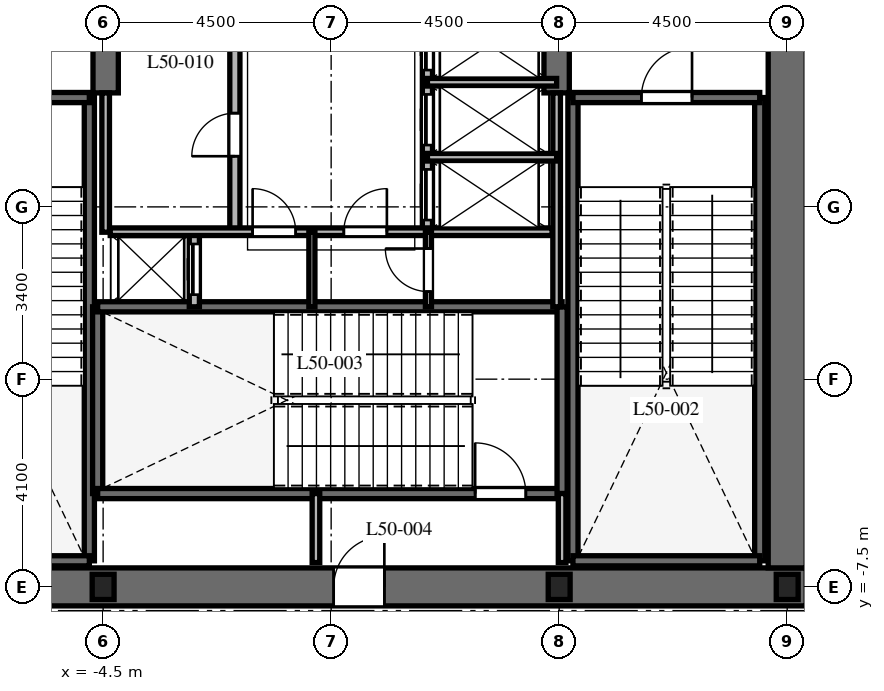
"""IFC4 building model, lengths in metres.
Left out: names, types, materials, properties, quantities, classifications, styles, units other than length and angle.
Written with IfcOpenShell. Run it as: python <this file> out.ifc"""

import sys

from ifc_helpers import new_model, si_unit, direction, frame, frame_2d, origin, origin_2d, place, context, subcontext, project, spatial, rectangle, i_section, extrude, element, fill, save


model = new_model("IFC4")
c1 = context("Model", 3, precision=1e-05, world=origin(), true_north=direction((0.0, 1.0)))
c2 = subcontext(c1, "Body", "Model", "MODEL_VIEW")
j1 = project(units=[si_unit("LENGTHUNIT", "METRE"), si_unit("PLANEANGLEUNIT", "RADIAN")], contexts=[c1])
p1 = place(None, origin())
s1 = spatial("IfcSite", under=j1, at=p1, CompositionType="ELEMENT")
p2 = place(p1, origin())
s2 = spatial("IfcBuilding", under=s1, at=p2, CompositionType="ELEMENT")
p3 = place(p2, frame((0.0, 0.0, 201.5)))
s3 = spatial("IfcBuildingStorey", under=s2, at=p3, CompositionType="ELEMENT", Elevation=201.5)
p4 = place(p3, frame((-9.375, -7.5, 0.0), z_axis=(0.0, 0.0, 1.0), x_axis=(1.0, 0.0, 0.0)))
e1 = element("IfcWall", 1, at=p4, inside=s3, PredefinedType="SHEAR", context=c2, shape_type="SweptSolid", body=[
    extrude(rectangle(XDim=18.75, YDim=0.75, at=frame_2d((9.375, 0.0))), origin(), (0.0, 0.0, 1.0), 5.0),
])
p5 = place(p4, frame((9.425, 0.0, 0.0)))
e2 = element("IfcOpeningElement", 2, at=p5, cuts=e1, PredefinedType="OPENING", context=c2, shape_type="SweptSolid", body=[
    extrude(rectangle(XDim=1.0, YDim=2.15, at=frame_2d((0.5, 1.075))), frame((0.0, 0.385, 0.0), z_axis=(0.0, -1.0, 0.0), x_axis=(1.0, 0.0, 0.0)), (0.0, 0.0, 1.0), 0.77),
])
p6 = place(p3, frame((9.0, -7.125, 0.0), z_axis=(0.0, 0.0, 1.0), x_axis=(0.0, 1.0, 0.0)))
e3 = element("IfcWall", 3, at=p6, inside=s3, PredefinedType="SHEAR", context=c2, shape_type="SweptSolid", body=[
    extrude(rectangle(XDim=14.25, YDim=0.75, at=frame_2d((7.125, 0.0))), origin(), (0.0, 0.0, 1.0), 5.0),
])
p7 = place(p6, frame((10.25, 0.0, 0.0)))
e4 = element("IfcOpeningElement", 4, at=p7, cuts=e3, PredefinedType="OPENING", context=c2, shape_type="SweptSolid", body=[
    extrude(rectangle(XDim=1.05, YDim=2.15, at=frame_2d((0.525, 1.075))), frame((0.0, 0.385, 0.0), z_axis=(0.0, -1.0, 0.0), x_axis=(1.0, 0.0, 0.0)), (0.0, 0.0, 1.0), 0.77),
])
for number, where, z_axis, x_axis in (
    (5, (-4.45, 2.25, 0.0), (0.0, 0.0, 1.0), (0.0, 1.0, 0.0)),
    (6, (4.45, 2.25, 0.0), (0.0, 0.0, 1.0), (0.0, 1.0, 0.0)),
):
    element("IfcWall", number, at=place(p3, frame(where, z_axis=z_axis, x_axis=x_axis)), inside=s3, PredefinedType="SHEAR", context=c2, shape_type="SweptSolid", body=[
        extrude(rectangle(XDim=4.875, YDim=0.5, at=frame_2d((2.438, 0.0))), origin(), (0.0, 0.0, 1.0), 5.0),
    ])
p8 = place(p3, frame((-4.772, -6.985, 0.0), z_axis=(0.0, 0.0, 1.0), x_axis=(0.0, 1.0, 0.0)))
e7 = element("IfcWall", 7, at=p8, inside=s3, PredefinedType="SHEAR", context=c2, shape_type="SweptSolid", body=[
    extrude(rectangle(XDim=9.143, YDim=0.2, at=frame_2d((4.572, 0.0))), origin(), (0.0, 0.0, 1.0), 5.0),
])
p9 = place(p3, frame((-8.458, -6.985, 0.0), z_axis=(0.0, 0.0, 1.0), x_axis=(1.0, 0.0, 0.0)))
e8 = element("IfcWall", 8, at=p9, inside=s3, PredefinedType="SHEAR", context=c2, shape_type="SweptSolid", body=[
    extrude(rectangle(XDim=3.686, YDim=0.2, at=frame_2d((1.843, 0.0))), origin(), (0.0, 0.0, 1.0), 5.0),
])
p10 = place(p3, frame((-8.458, 2.158, 0.0), z_axis=(0.0, 0.0, 1.0), x_axis=(1.0, 0.0, 0.0)))
e9 = element("IfcWall", 9, at=p10, inside=s3, PredefinedType="SHEAR", context=c2, shape_type="SweptSolid", body=[
    extrude(rectangle(XDim=3.686, YDim=0.2, at=frame_2d((1.843, 0.0))), origin(), (0.0, 0.0, 1.0), 5.0),
])
p11 = place(p10, frame((1.3, 0.0, 0.0)))
e10 = element("IfcOpeningElement", 10, at=p11, cuts=e9, PredefinedType="OPENING", context=c2, shape_type="SweptSolid", body=[
    extrude(rectangle(XDim=1.0, YDim=2.15, at=frame_2d((0.5, 1.075))), frame((0.0, 0.11, 0.0), z_axis=(0.0, -1.0, 0.0), x_axis=(1.0, 0.0, 0.0)), (0.0, 0.0, 1.0), 0.22),
])
for number, where, z_axis, x_axis in (
    (11, (4.772, -6.985, 0.0), (0.0, 0.0, 1.0), (0.0, 1.0, 0.0)),
    (12, (8.458, -6.985, 0.0), (0.0, 0.0, 1.0), (0.0, 1.0, 0.0)),
):
    element("IfcWall", number, at=place(p3, frame(where, z_axis=z_axis, x_axis=x_axis)), inside=s3, PredefinedType="SHEAR", context=c2, shape_type="SweptSolid", body=[
        extrude(rectangle(XDim=9.143, YDim=0.2, at=frame_2d((4.572, 0.0))), origin(), (0.0, 0.0, 1.0), 5.0),
    ])
p12 = place(p3, frame((4.772, -6.985, 0.0), z_axis=(0.0, 0.0, 1.0), x_axis=(1.0, 0.0, 0.0)))
e13 = element("IfcWall", 13, at=p12, inside=s3, PredefinedType="SHEAR", context=c2, shape_type="SweptSolid", body=[
    extrude(rectangle(XDim=3.686, YDim=0.2, at=frame_2d((1.843, 0.0))), origin(), (0.0, 0.0, 1.0), 5.0),
])
p13 = place(p3, frame((4.772, 2.158, 0.0), z_axis=(0.0, 0.0, 1.0), x_axis=(1.0, 0.0, 0.0)))
e14 = element("IfcWall", 14, at=p13, inside=s3, PredefinedType="SHEAR", context=c2, shape_type="SweptSolid", body=[
    extrude(rectangle(XDim=3.686, YDim=0.2, at=frame_2d((1.843, 0.0))), origin(), (0.0, 0.0, 1.0), 5.0),
])
p14 = place(p13, frame((1.35, 0.0, 0.0)))
e15 = element("IfcOpeningElement", 15, at=p14, cuts=e14, PredefinedType="OPENING", context=c2, shape_type="SweptSolid", body=[
    extrude(rectangle(XDim=1.0, YDim=2.15, at=frame_2d((0.5, 1.075))), frame((0.0, 0.11, 0.0), z_axis=(0.0, -1.0, 0.0), x_axis=(1.0, 0.0, 0.0)), (0.0, 0.0, 1.0), 0.22),
])
p15 = place(p3, frame((-4.608, -5.658, 0.0), z_axis=(0.0, 0.0, 1.0), x_axis=(0.0, 1.0, 0.0)))
e16 = element("IfcWall", 16, at=p15, inside=s3, PredefinedType="SHEAR", context=c2, shape_type="SweptSolid", body=[
    extrude(rectangle(XDim=3.686, YDim=0.2, at=frame_2d((1.843, 0.0))), origin(), (0.0, 0.0, 1.0), 5.0),
])
p16 = place(p3, frame((-4.608, -5.658, 0.0), z_axis=(0.0, 0.0, 1.0), x_axis=(1.0, 0.0, 0.0)))
e17 = element("IfcWall", 17, at=p16, inside=s3, PredefinedType="SHEAR", context=c2, shape_type="SweptSolid", body=[
    extrude(rectangle(XDim=9.166, YDim=0.2, at=frame_2d((4.583, 0.0))), origin(), (0.0, 0.0, 1.0), 5.0),
])
p17 = place(p16, frame((7.45, 0.0, 0.0)))
e18 = element("IfcOpeningElement", 18, at=p17, cuts=e17, PredefinedType="OPENING", context=c2, shape_type="SweptSolid", body=[
    extrude(rectangle(XDim=1.0, YDim=2.15, at=frame_2d((0.5, 1.075))), frame((0.0, 0.11, 0.0), z_axis=(0.0, -1.0, 0.0), x_axis=(1.0, 0.0, 0.0)), (0.0, 0.0, 1.0), 0.22),
])
p18 = place(p3, frame((-4.608, -1.972, 0.0), z_axis=(0.0, 0.0, 1.0), x_axis=(1.0, 0.0, 0.0)))
e19 = element("IfcWall", 19, at=p18, inside=s3, PredefinedType="SHEAR", context=c2, shape_type="SweptSolid", body=[
    extrude(rectangle(XDim=9.166, YDim=0.2, at=frame_2d((4.583, 0.0))), origin(), (0.0, 0.0, 1.0), 5.0),
])
p19 = place(p3, frame((4.558, -5.658, 0.0), z_axis=(0.0, 0.0, 1.0), x_axis=(0.0, 1.0, 0.0)))
e20 = element("IfcWall", 20, at=p19, inside=s3, PredefinedType="SHEAR", context=c2, shape_type="SweptSolid", body=[
    extrude(rectangle(XDim=3.686, YDim=0.2, at=frame_2d((1.843, 0.0))), origin(), (0.0, 0.0, 1.0), 5.0),
])
for number, where, z_axis, x_axis in (
    (21, (-4.5, -7.5, 0.0), (0.0, 0.0, 1.0), (1.0, 0.0, 0.0)),
    (22, (4.5, -7.5, 0.0), (0.0, 0.0, 1.0), (1.0, 0.0, 0.0)),
    (23, (9.0, -7.5, 0.0), (0.0, 0.0, 1.0), (1.0, 0.0, 0.0)),
):
    element("IfcColumn", number, at=place(p3, frame(where, z_axis=z_axis, x_axis=x_axis)), inside=s3, PredefinedType="COLUMN", context=c2, shape_type="SweptSolid", body=[
        extrude(i_section(OverallWidth=0.432, OverallDepth=0.498, WebThickness=0.056, FlangeThickness=0.089, at=origin_2d()), origin(), (0.0, 0.0, 1.0), 5.0),
    ])
for number, where, z_axis, x_axis in (
    (24, (-0.3, -7.02, 0.0), (0.0, 0.0, 1.0), (0.0, 1.0, 0.0)),
    (25, (4.558, -7.02, 0.0), (0.0, 0.0, 1.0), (0.0, 1.0, 0.0)),
):
    element("IfcWall", number, at=place(p3, frame(where, z_axis=z_axis, x_axis=x_axis)), inside=s3, PredefinedType="PARTITIONING", context=c2, shape_type="SweptSolid", body=[
        extrude(rectangle(XDim=1.362, YDim=0.15, at=frame_2d((0.681, 0.0))), origin(), (0.0, 0.0, 1.0), 4.7),
    ])
p20 = place(p3, frame((-2.7, -1.972, 0.0), z_axis=(0.0, 0.0, 1.0), x_axis=(0.0, 1.0, 0.0)))
e26 = element("IfcWall", 26, at=p20, inside=s3, PredefinedType="PARTITIONING", context=c2, shape_type="SweptSolid", body=[
    extrude(rectangle(XDim=1.472, YDim=0.2, at=frame_2d((0.736, 0.0))), origin(), (0.0, 0.0, 1.0), 4.7),
])
p21 = place(p20, frame((0.24, 0.0, 0.0)))
e27 = element("IfcOpeningElement", 27, at=p21, cuts=e26, PredefinedType="OPENING", context=c2, shape_type="SweptSolid", body=[
    extrude(rectangle(XDim=1.0, YDim=2.2, at=frame_2d((0.5, 1.1))), frame((0.0, 0.11, 0.0), z_axis=(0.0, -1.0, 0.0), x_axis=(1.0, 0.0, 0.0)), (0.0, 0.0, 1.0), 0.22),
])
p22 = place(p3, frame((-4.45, -0.5, 0.0), z_axis=(0.0, 0.0, 1.0), x_axis=(0.0, 1.0, 0.0)))
e28 = element("IfcWall", 28, at=p22, inside=s3, PredefinedType="PARTITIONING", context=c2, shape_type="SweptSolid", body=[
    extrude(rectangle(XDim=2.75, YDim=0.15, at=frame_2d((1.375, 0.0))), origin(), (0.0, 0.0, 1.0), 4.7),
])
p23 = place(p3, frame((4.45, -1.972, 0.0), z_axis=(0.0, 0.0, 1.0), x_axis=(0.0, 1.0, 0.0)))
e29 = element("IfcWall", 29, at=p23, inside=s3, PredefinedType="PARTITIONING", context=c2, shape_type="SweptSolid", body=[
    extrude(rectangle(XDim=4.222, YDim=0.15, at=frame_2d((2.111, 0.0))), origin(), (0.0, 0.0, 1.0), 4.7),
])
p24 = place(p3, frame((-1.9, -0.5, 0.0), z_axis=(0.0, 0.0, 1.0), x_axis=(0.0, 1.0, 0.0)))
e30 = element("IfcWall", 30, at=p24, inside=s3, PredefinedType="PARTITIONING", context=c2, shape_type="SweptSolid", body=[
    extrude(rectangle(XDim=4.44, YDim=0.2, at=frame_2d((2.22, 0.0))), origin(), (0.0, 0.0, 1.0), 4.7),
])
p25 = place(p24, frame((1.5, 0.0, 0.0)))
e31 = element("IfcOpeningElement", 31, at=p25, cuts=e30, PredefinedType="OPENING", context=c2, shape_type="SweptSolid", body=[
    extrude(rectangle(XDim=0.85, YDim=2.03, at=frame_2d((0.425, 1.015))), frame((0.0, 0.11, 0.0), z_axis=(0.0, -1.0, 0.0), x_axis=(1.0, 0.0, 0.0)), (0.0, 0.0, 1.0), 0.22),
])
p26 = place(p3, frame((1.9, -0.5, 0.0), z_axis=(0.0, 0.0, 1.0), x_axis=(0.0, 1.0, 0.0)))
e32 = element("IfcWall", 32, at=p26, inside=s3, PredefinedType="PARTITIONING", context=c2, shape_type="SweptSolid", body=[
    extrude(rectangle(XDim=4.44, YDim=0.2, at=frame_2d((2.22, 0.0))), origin(), (0.0, 0.0, 1.0), 4.7),
])
p27 = place(p26, frame((0.24, 0.0, 0.0)))
e33 = element("IfcOpeningElement", 33, at=p27, cuts=e32, PredefinedType="OPENING", context=c2, shape_type="SweptSolid", body=[
    extrude(rectangle(XDim=1.0, YDim=2.2, at=frame_2d((0.5, 1.1))), frame((0.0, 0.11, 0.0), z_axis=(0.0, -1.0, 0.0), x_axis=(1.0, 0.0, 0.0)), (0.0, 0.0, 1.0), 0.22),
])
p28 = place(p26, frame((1.72, 0.0, 0.0)))
e34 = element("IfcOpeningElement", 34, at=p28, cuts=e32, PredefinedType="OPENING", context=c2, shape_type="SweptSolid", body=[
    extrude(rectangle(XDim=1.0, YDim=2.2, at=frame_2d((0.5, 1.1))), frame((0.0, 0.11, 0.0), z_axis=(0.0, -1.0, 0.0), x_axis=(1.0, 0.0, 0.0)), (0.0, 0.0, 1.0), 0.22),
])
p29 = place(p26, frame((3.2, 0.0, 0.0)))
e35 = element("IfcOpeningElement", 35, at=p29, cuts=e32, PredefinedType="OPENING", context=c2, shape_type="SweptSolid", body=[
    extrude(rectangle(XDim=1.0, YDim=2.2, at=frame_2d((0.5, 1.1))), frame((0.0, 0.11, 0.0), z_axis=(0.0, -1.0, 0.0), x_axis=(1.0, 0.0, 0.0)), (0.0, 0.0, 1.0), 0.22),
])
for number, where, z_axis, x_axis in (
    (36, (1.9, 0.98, 0.0), (0.0, 0.0, 1.0), (1.0, 0.0, 0.0)),
    (37, (1.9, 2.46, 0.0), (0.0, 0.0, 1.0), (1.0, 0.0, 0.0)),
):
    element("IfcWall", number, at=place(p3, frame(where, z_axis=z_axis, x_axis=x_axis)), inside=s3, PredefinedType="PARTITIONING", context=c2, shape_type="SweptSolid", body=[
        extrude(rectangle(XDim=2.55, YDim=0.15, at=frame_2d((1.275, 0.0))), origin(), (0.0, 0.0, 1.0), 4.7),
    ])
p30 = place(p3, frame((-4.36, -0.49, 0.0), z_axis=(0.0, 0.0, 1.0), x_axis=(1.0, 0.0, 0.0)))
e38 = element("IfcWall", 38, at=p30, inside=s3, PredefinedType="PARTITIONING", context=c2, shape_type="SweptSolid", body=[
    extrude(rectangle(XDim=8.72, YDim=0.15, at=frame_2d((4.36, 0.0))), origin(), (0.0, 0.0, 1.0), 4.7),
])
p31 = place(p30, frame((2.81, 0.0, 0.0)))
e39 = element("IfcOpeningElement", 39, at=p31, cuts=e38, PredefinedType="OPENING", context=c2, shape_type="SweptSolid", body=[
    extrude(rectangle(XDim=0.85, YDim=2.03, at=frame_2d((0.425, 1.015))), frame((0.0, 0.085, 0.0), z_axis=(0.0, -1.0, 0.0), x_axis=(1.0, 0.0, 0.0)), (0.0, 0.0, 1.0), 0.17),
])
p32 = place(p30, frame((4.61, 0.0, 0.0)))
e40 = element("IfcOpeningElement", 40, at=p32, cuts=e38, PredefinedType="OPENING", context=c2, shape_type="SweptSolid", body=[
    extrude(rectangle(XDim=0.85, YDim=2.03, at=frame_2d((0.425, 1.015))), frame((0.0, 0.085, 0.0), z_axis=(0.0, -1.0, 0.0), x_axis=(1.0, 0.0, 0.0)), (0.0, 0.0, 1.0), 0.17),
])
p33 = place(p3, frame((-0.38, -1.972, 0.0), z_axis=(0.0, 0.0, 1.0), x_axis=(0.0, 1.0, 0.0)))
e41 = element("IfcWall", 41, at=p33, inside=s3, PredefinedType="PARTITIONING", context=c2, shape_type="SweptSolid", body=[
    extrude(rectangle(XDim=1.472, YDim=0.12, at=frame_2d((0.736, 0.0))), origin(), (0.0, 0.0, 1.0), 4.7),
])
p34 = place(p3, frame((1.92, -1.972, 0.0), z_axis=(0.0, 0.0, 1.0), x_axis=(0.0, 1.0, 0.0)))
e42 = element("IfcWall", 42, at=p34, inside=s3, PredefinedType="PARTITIONING", context=c2, shape_type="SweptSolid", body=[
    extrude(rectangle(XDim=1.472, YDim=0.12, at=frame_2d((0.736, 0.0))), origin(), (0.0, 0.0, 1.0), 4.7),
])
p35 = place(p34, frame((0.3, 0.0, 0.0)))
e43 = element("IfcOpeningElement", 43, at=p35, cuts=e42, PredefinedType="OPENING", context=c2, shape_type="SweptSolid", body=[
    extrude(rectangle(XDim=0.85, YDim=2.03, at=frame_2d((0.425, 1.015))), frame((0.0, 0.07, 0.0), z_axis=(0.0, -1.0, 0.0), x_axis=(1.0, 0.0, 0.0)), (0.0, 0.0, 1.0), 0.14),
])
p36 = place(p14, origin())
e44 = element("IfcDoor", 44, at=p36, inside=s3, OperationType="SINGLE_SWING_RIGHT", PredefinedType="DOOR", context=c2, shape_type="SweptSolid", body=[
    extrude(rectangle(XDim=1.0, YDim=2.15, at=frame_2d((0.5, 1.075))), frame((0.0, 0.025, 0.0), z_axis=(0.0, -1.0, 0.0), x_axis=(1.0, 0.0, 0.0)), (0.0, 0.0, 1.0), 0.05),
])
fill(e15, e44)
p37 = place(p17, origin())
e45 = element("IfcDoor", 45, at=p37, inside=s3, OperationType="SINGLE_SWING_LEFT", PredefinedType="DOOR", context=c2, shape_type="SweptSolid", body=[
    extrude(rectangle(XDim=1.0, YDim=2.15, at=frame_2d((0.5, 1.075))), frame((0.0, 0.025, 0.0), z_axis=(0.0, -1.0, 0.0), x_axis=(1.0, 0.0, 0.0)), (0.0, 0.0, 1.0), 0.05),
])
fill(e18, e45)
p38 = place(p5, origin())
e46 = element("IfcDoor", 46, at=p38, inside=s3, OperationType="SINGLE_SWING_RIGHT", PredefinedType="DOOR", context=c2, shape_type="SweptSolid", body=[
    extrude(rectangle(XDim=1.0, YDim=2.15, at=frame_2d((0.5, 1.075))), frame((0.0, 0.025, 0.0), z_axis=(0.0, -1.0, 0.0), x_axis=(1.0, 0.0, 0.0)), (0.0, 0.0, 1.0), 0.05),
])
fill(e2, e46)
p39 = place(p21, origin())
e47 = element("IfcDoor", 47, at=p39, inside=s3, OperationType="SLIDING_TO_LEFT", PredefinedType="DOOR", context=c2, shape_type="SweptSolid", body=[
    extrude(rectangle(XDim=1.0, YDim=2.2, at=frame_2d((0.5, 1.1))), frame((0.0, 0.025, 0.0), z_axis=(0.0, -1.0, 0.0), x_axis=(1.0, 0.0, 0.0)), (0.0, 0.0, 1.0), 0.05),
])
fill(e27, e47)
p40 = place(p25, origin())
e48 = element("IfcDoor", 48, at=p40, inside=s3, OperationType="SINGLE_SWING_LEFT", PredefinedType="DOOR", context=c2, shape_type="SweptSolid", body=[
    extrude(rectangle(XDim=0.85, YDim=2.03, at=frame_2d((0.425, 1.015))), frame((0.0, 0.025, 0.0), z_axis=(0.0, -1.0, 0.0), x_axis=(1.0, 0.0, 0.0)), (0.0, 0.0, 1.0), 0.05),
])
fill(e31, e48)
p41 = place(p27, origin())
e49 = element("IfcDoor", 49, at=p41, inside=s3, OperationType="SLIDING_TO_RIGHT", PredefinedType="DOOR", context=c2, shape_type="SweptSolid", body=[
    extrude(rectangle(XDim=1.0, YDim=2.2, at=frame_2d((0.5, 1.1))), frame((0.0, 0.025, 0.0), z_axis=(0.0, -1.0, 0.0), x_axis=(1.0, 0.0, 0.0)), (0.0, 0.0, 1.0), 0.05),
])
fill(e33, e49)
p42 = place(p28, origin())
e50 = element("IfcDoor", 50, at=p42, inside=s3, OperationType="SLIDING_TO_RIGHT", PredefinedType="DOOR", context=c2, shape_type="SweptSolid", body=[
    extrude(rectangle(XDim=1.0, YDim=2.2, at=frame_2d((0.5, 1.1))), frame((0.0, 0.025, 0.0), z_axis=(0.0, -1.0, 0.0), x_axis=(1.0, 0.0, 0.0)), (0.0, 0.0, 1.0), 0.05),
])
fill(e34, e50)
p43 = place(p29, origin())
e51 = element("IfcDoor", 51, at=p43, inside=s3, OperationType="SLIDING_TO_RIGHT", PredefinedType="DOOR", context=c2, shape_type="SweptSolid", body=[
    extrude(rectangle(XDim=1.0, YDim=2.2, at=frame_2d((0.5, 1.1))), frame((0.0, 0.025, 0.0), z_axis=(0.0, -1.0, 0.0), x_axis=(1.0, 0.0, 0.0)), (0.0, 0.0, 1.0), 0.05),
])
fill(e35, e51)
p44 = place(p31, origin())
e52 = element("IfcDoor", 52, at=p44, inside=s3, OperationType="SINGLE_SWING_LEFT", PredefinedType="DOOR", context=c2, shape_type="SweptSolid", body=[
    extrude(rectangle(XDim=0.85, YDim=2.03, at=frame_2d((0.425, 1.015))), frame((0.0, 0.025, 0.0), z_axis=(0.0, -1.0, 0.0), x_axis=(1.0, 0.0, 0.0)), (0.0, 0.0, 1.0), 0.05),
])
fill(e39, e52)
p45 = place(p32, origin())
e53 = element("IfcDoor", 53, at=p45, inside=s3, OperationType="SINGLE_SWING_RIGHT", PredefinedType="DOOR", context=c2, shape_type="SweptSolid", body=[
    extrude(rectangle(XDim=0.85, YDim=2.03, at=frame_2d((0.425, 1.015))), frame((0.0, 0.025, 0.0), z_axis=(0.0, -1.0, 0.0), x_axis=(1.0, 0.0, 0.0)), (0.0, 0.0, 1.0), 0.05),
])
fill(e40, e53)
p46 = place(p35, origin())
e54 = element("IfcDoor", 54, at=p46, inside=s3, OperationType="SINGLE_SWING_RIGHT", PredefinedType="DOOR", context=c2, shape_type="SweptSolid", body=[
    extrude(rectangle(XDim=0.85, YDim=2.03, at=frame_2d((0.425, 1.015))), frame((0.0, 0.025, 0.0), z_axis=(0.0, -1.0, 0.0), x_axis=(1.0, 0.0, 0.0)), (0.0, 0.0, 1.0), 0.05),
])
fill(e43, e54)
save(model, sys.argv[1])
